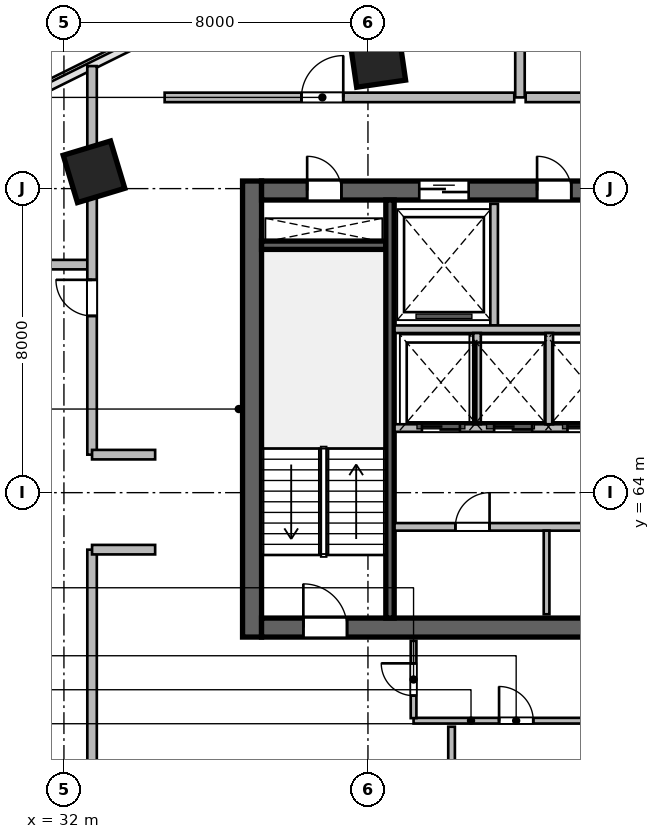
"""IFC4 building model, lengths in metres.
Left out: names, types, materials, properties, quantities, classifications, styles, units other than length and angle.
Written with IfcOpenShell. Run it as: python <this file> out.ifc"""

import sys

from ifc_helpers import new_model, si_unit, direction, frame, frame_2d, origin, origin_2d, place, context, subcontext, project, spatial, rectangle, extrude, source, transform, mapped, element, fill, save


model = new_model("IFC4")
c1 = context("Model", 3, precision=1e-05, world=origin(), true_north=direction((0.0, 1.0)))
c2 = subcontext(c1, "Body", "Model", "MODEL_VIEW")
j1 = project(units=[si_unit("LENGTHUNIT", "METRE"), si_unit("PLANEANGLEUNIT", "RADIAN")], contexts=[c1])
p1 = place(None, origin())
s1 = spatial("IfcSite", under=j1, at=p1, CompositionType="ELEMENT")
p2 = place(p1, origin())
s2 = spatial("IfcBuilding", under=s1, at=p2, CompositionType="ELEMENT")
p3 = place(p2, frame((0.0, 0.0, 123.3)))
s3 = spatial("IfcBuildingStorey", under=s2, at=p3, CompositionType="ELEMENT", Elevation=123.3)
m1 = source(origin(), c2, "Body", "SweptSolid", [
    extrude(rectangle(XDim=12.0, YDim=0.5, at=frame_2d((6.0, 0.0))), origin(), (0.0, 0.0, 1.0), 3.9),
])
p4 = place(p3, frame((36.95, 60.2, 0.0), z_axis=(0.0, 0.0, 1.0), x_axis=(0.0, 1.0, 0.0)))
e1 = element("IfcWall", 1, at=p4, inside=s3, PredefinedType="SHEAR", context=c2, shape_type="MappedRepresentation", body=[
    mapped(m1, transform((0.0, 0.0, 0.0), scale=1.0)),
])
m2 = source(origin(), c2, "Body", "SweptSolid", [
    extrude(rectangle(XDim=21.6, YDim=0.5, at=frame_2d((10.8, 0.0))), origin(), (0.0, 0.0, 1.0), 3.9),
])
p5 = place(p3, frame((37.2, 60.45, 0.0), z_axis=(0.0, 0.0, 1.0), x_axis=(1.0, 0.0, 0.0)))
e2 = element("IfcWall", 2, at=p5, inside=s3, PredefinedType="SHEAR", context=c2, shape_type="MappedRepresentation", body=[
    mapped(m2, transform((0.0, 0.0, 0.0), scale=1.0)),
])
p6 = place(p5, frame((1.1, 0.0, 0.0)))
e3 = element("IfcOpeningElement", 3, at=p6, cuts=e2, PredefinedType="OPENING", context=c2, shape_type="SweptSolid", body=[
    extrude(rectangle(XDim=1.15, YDim=2.15, at=frame_2d((0.575, 1.075))), frame((0.0, 0.26, 0.0), z_axis=(0.0, -1.0, 0.0), x_axis=(1.0, 0.0, 0.0)), (0.0, 0.0, 1.0), 0.52),
])
p7 = place(p5, frame((19.5, 0.0, 0.0)))
e4 = element("IfcOpeningElement", 4, at=p7, cuts=e2, PredefinedType="OPENING", context=c2, shape_type="SweptSolid", body=[
    extrude(rectangle(XDim=0.9, YDim=2.1, at=frame_2d((0.45, 1.05))), frame((0.0, 0.26, 0.0), z_axis=(0.0, -1.0, 0.0), x_axis=(1.0, 0.0, 0.0)), (0.0, 0.0, 1.0), 0.52),
])
p8 = place(p5, frame((12.02, 0.0, 0.0)))
e5 = element("IfcOpeningElement", 5, at=p8, cuts=e2, PredefinedType="OPENING", context=c2, shape_type="SweptSolid", body=[
    extrude(rectangle(XDim=1.6, YDim=2.15, at=frame_2d((0.8, 1.075))), frame((0.0, 0.26, 0.0), z_axis=(0.0, -1.0, 0.0), x_axis=(1.0, 0.0, 0.0)), (0.0, 0.0, 1.0), 0.52),
])
p9 = place(p3, frame((37.2, 71.95, 0.0), z_axis=(0.0, 0.0, 1.0), x_axis=(1.0, 0.0, 0.0)))
e6 = element("IfcWall", 6, at=p9, inside=s3, PredefinedType="SHEAR", context=c2, shape_type="MappedRepresentation", body=[
    mapped(m2, transform((0.0, 0.0, 0.0), scale=1.0)),
])
p10 = place(p9, frame((1.2, 0.0, 0.0)))
e7 = element("IfcOpeningElement", 7, at=p10, cuts=e6, PredefinedType="OPENING", context=c2, shape_type="SweptSolid", body=[
    extrude(rectangle(XDim=0.9, YDim=2.1, at=frame_2d((0.45, 1.05))), frame((0.0, 0.26, 0.0), z_axis=(0.0, -1.0, 0.0), x_axis=(1.0, 0.0, 0.0)), (0.0, 0.0, 1.0), 0.52),
])
p11 = place(p9, frame((14.7, 0.0, 0.0)))
e8 = element("IfcOpeningElement", 8, at=p11, cuts=e6, PredefinedType="OPENING", context=c2, shape_type="SweptSolid", body=[
    extrude(rectangle(XDim=1.2, YDim=2.15, at=frame_2d((0.6, 1.075))), frame((0.0, 0.26, 0.0), z_axis=(0.0, -1.0, 0.0), x_axis=(1.0, 0.0, 0.0)), (0.0, 0.0, 1.0), 0.52),
])
p12 = place(p9, frame((4.15, 0.0, 0.0)))
e9 = element("IfcOpeningElement", 9, at=p12, cuts=e6, PredefinedType="OPENING", context=c2, shape_type="SweptSolid", body=[
    extrude(rectangle(XDim=1.3, YDim=2.15, at=frame_2d((0.65, 1.075))), frame((0.0, 0.26, 0.0), z_axis=(0.0, -1.0, 0.0), x_axis=(1.0, 0.0, 0.0)), (0.0, 0.0, 1.0), 0.52),
])
p13 = place(p9, frame((7.25, 0.0, 0.0)))
e10 = element("IfcOpeningElement", 10, at=p13, cuts=e6, PredefinedType="OPENING", context=c2, shape_type="SweptSolid", body=[
    extrude(rectangle(XDim=0.9, YDim=2.1, at=frame_2d((0.45, 1.05))), frame((0.0, 0.26, 0.0), z_axis=(0.0, -1.0, 0.0), x_axis=(1.0, 0.0, 0.0)), (0.0, 0.0, 1.0), 0.52),
])
m3 = source(origin(), c2, "Body", "SweptSolid", [
    extrude(rectangle(XDim=3.27, YDim=0.22, at=frame_2d((1.635, 0.0))), origin(), (0.0, 0.0, 1.0), 3.9),
])
p14 = place(p3, frame((37.2, 70.51, 0.0), z_axis=(0.0, 0.0, 1.0), x_axis=(1.0, 0.0, 0.0)))
e11 = element("IfcWall", 11, at=p14, inside=s3, PredefinedType="SHEAR", context=c2, shape_type="MappedRepresentation", body=[
    mapped(m3, transform((0.0, 0.0, 0.0), scale=1.0)),
])
m4 = source(origin(), c2, "Body", "SweptSolid", [
    extrude(rectangle(XDim=11.0, YDim=0.22, at=frame_2d((5.5, 0.0))), origin(), (0.0, 0.0, 1.0), 3.9),
])
p15 = place(p3, frame((40.58, 60.7, 0.0), z_axis=(0.0, 0.0, 1.0), x_axis=(0.0, 1.0, 0.0)))
e12 = element("IfcWall", 12, at=p15, inside=s3, PredefinedType="SHEAR", context=c2, shape_type="MappedRepresentation", body=[
    mapped(m4, transform((0.0, 0.0, 0.0), scale=1.0)),
])
m5 = source(origin(), c2, "Body", "SweptSolid", [
    extrude(rectangle(XDim=1.3, YDim=1.3, at=origin_2d()), origin(), (0.0, 0.0, 1.0), 3.9),
])
for number, where, z_axis, x_axis in (
    (13, (32.791, 72.442, 0.0), (0.0, 0.0, 1.0), (-0.289, 0.957, 0.0)),
    (14, (40.253, 75.404, 0.0), (0.0, 0.0, 1.0), (-0.143, 0.99, 0.0)),
):
    element("IfcColumn", number, at=place(p3, frame(where, z_axis=z_axis, x_axis=x_axis)), inside=s3, PredefinedType="COLUMN", context=c2, shape_type="MappedRepresentation", body=[
        mapped(m5, transform((0.0, 0.0, 0.0), scale=1.0)),
    ])
m6 = source(origin(), c2, "Body", "SweptSolid", [
    extrude(rectangle(XDim=3.2, YDim=0.2, at=frame_2d((1.6, 0.0))), origin(), (0.0, 0.0, 1.0), 3.65),
])
p16 = place(p3, frame((43.32, 68.4, 0.0), z_axis=(0.0, 0.0, 1.0), x_axis=(0.0, 1.0, 0.0)))
e15 = element("IfcWall", 15, at=p16, inside=s3, PredefinedType="SOLIDWALL", context=c2, shape_type="MappedRepresentation", body=[
    mapped(m6, transform((0.0, 0.0, 0.0), scale=1.0)),
])
m7 = source(origin(), c2, "Body", "SweptSolid", [
    extrude(rectangle(XDim=8.8, YDim=0.2, at=frame_2d((4.4, 0.0))), origin(), (0.0, 0.0, 1.0), 3.65),
])
p17 = place(p3, frame((40.7, 68.3, 0.0), z_axis=(0.0, 0.0, 1.0), x_axis=(1.0, 0.0, 0.0)))
e16 = element("IfcWall", 16, at=p17, inside=s3, PredefinedType="SOLIDWALL", context=c2, shape_type="MappedRepresentation", body=[
    mapped(m7, transform((0.0, 0.0, 0.0), scale=1.0)),
])
m8 = source(origin(), c2, "Body", "SweptSolid", [
    extrude(rectangle(XDim=8.02, YDim=0.2, at=frame_2d((4.01, 0.0))), origin(), (0.0, 0.0, 1.0), 3.65),
])
p18 = place(p3, frame((40.7, 63.1, 0.0), z_axis=(0.0, 0.0, 1.0), x_axis=(1.0, 0.0, 0.0)))
e17 = element("IfcWall", 17, at=p18, inside=s3, PredefinedType="SOLIDWALL", context=c2, shape_type="MappedRepresentation", body=[
    mapped(m8, transform((0.0, 0.0, 0.0), scale=1.0)),
])
p19 = place(p18, frame((1.6, 0.0, 0.0)))
e18 = element("IfcOpeningElement", 18, at=p19, cuts=e17, PredefinedType="OPENING", context=c2, shape_type="SweptSolid", body=[
    extrude(rectangle(XDim=0.9, YDim=2.1, at=frame_2d((0.45, 1.05))), frame((0.0, 0.11, 0.0), z_axis=(0.0, -1.0, 0.0), x_axis=(1.0, 0.0, 0.0)), (0.0, 0.0, 1.0), 0.22),
])
p20 = place(p18, frame((5.54, 0.0, 0.0)))
e19 = element("IfcOpeningElement", 19, at=p20, cuts=e17, PredefinedType="OPENING", context=c2, shape_type="SweptSolid", body=[
    extrude(rectangle(XDim=0.9, YDim=2.1, at=frame_2d((0.45, 1.05))), frame((0.0, 0.11, 0.0), z_axis=(0.0, -1.0, 0.0), x_axis=(1.0, 0.0, 0.0)), (0.0, 0.0, 1.0), 0.22),
])
m9 = source(origin(), c2, "Body", "SweptSolid", [
    extrude(rectangle(XDim=2.2, YDim=0.15, at=frame_2d((1.1, 0.0))), origin(), (0.0, 0.0, 1.0), 3.65),
])
p21 = place(p3, frame((44.7, 60.8, 0.0), z_axis=(0.0, 0.0, 1.0), x_axis=(0.0, 1.0, 0.0)))
e20 = element("IfcWall", 20, at=p21, inside=s3, PredefinedType="PARTITIONING", context=c2, shape_type="MappedRepresentation", body=[
    mapped(m9, transform((0.0, 0.0, 0.0), scale=1.0)),
])
p22 = place(p3, frame((40.7, 65.7, 0.0), z_axis=(0.0, 0.0, 1.0), x_axis=(1.0, 0.0, 0.0)))
e21 = element("IfcWall", 21, at=p22, inside=s3, PredefinedType="SOLIDWALL", context=c2, shape_type="MappedRepresentation", body=[
    mapped(m7, transform((0.0, 0.0, 0.0), scale=1.0)),
])
p23 = place(p22, frame((0.72, 0.0, 0.0)))
e22 = element("IfcOpeningElement", 22, at=p23, cuts=e21, PredefinedType="OPENING", context=c2, shape_type="SweptSolid", body=[
    extrude(rectangle(XDim=1.0, YDim=2.15, at=frame_2d((0.5, 1.075))), frame((0.0, 0.11, 0.0), z_axis=(0.0, -1.0, 0.0), x_axis=(1.0, 0.0, 0.0)), (0.0, 0.0, 1.0), 0.22),
])
p24 = place(p22, frame((2.62, 0.0, 0.0)))
e23 = element("IfcOpeningElement", 23, at=p24, cuts=e21, PredefinedType="OPENING", context=c2, shape_type="SweptSolid", body=[
    extrude(rectangle(XDim=1.0, YDim=2.15, at=frame_2d((0.5, 1.075))), frame((0.0, 0.11, 0.0), z_axis=(0.0, -1.0, 0.0), x_axis=(1.0, 0.0, 0.0)), (0.0, 0.0, 1.0), 0.22),
])
p25 = place(p22, frame((4.55, 0.0, 0.0)))
e24 = element("IfcOpeningElement", 24, at=p25, cuts=e21, PredefinedType="OPENING", context=c2, shape_type="SweptSolid", body=[
    extrude(rectangle(XDim=1.0, YDim=2.15, at=frame_2d((0.5, 1.075))), frame((0.0, 0.11, 0.0), z_axis=(0.0, -1.0, 0.0), x_axis=(1.0, 0.0, 0.0)), (0.0, 0.0, 1.0), 0.22),
])
p26 = place(p22, frame((6.55, 0.0, 0.0)))
e25 = element("IfcOpeningElement", 25, at=p26, cuts=e21, PredefinedType="OPENING", context=c2, shape_type="SweptSolid", body=[
    extrude(rectangle(XDim=1.0, YDim=2.15, at=frame_2d((0.5, 1.075))), frame((0.0, 0.11, 0.0), z_axis=(0.0, -1.0, 0.0), x_axis=(1.0, 0.0, 0.0)), (0.0, 0.0, 1.0), 0.22),
])
m10 = source(origin(), c2, "Body", "SweptSolid", [
    extrude(rectangle(XDim=2.4, YDim=0.2, at=frame_2d((1.2, 0.0))), origin(), (0.0, 0.0, 1.0), 3.65),
])
for number, where, z_axis, x_axis in (
    (26, (42.87, 65.8, 0.0), (0.0, 0.0, 1.0), (0.0, 1.0, 0.0)),
    (27, (44.77, 65.8, 0.0), (0.0, 0.0, 1.0), (0.0, 1.0, 0.0)),
):
    element("IfcWall", number, at=place(p3, frame(where, z_axis=z_axis, x_axis=x_axis)), inside=s3, PredefinedType="SOLIDWALL", context=c2, shape_type="MappedRepresentation", body=[
        mapped(m10, transform((0.0, 0.0, 0.0), scale=1.0)),
    ])
m11 = source(origin(), c2, "Body", "SweptSolid", [
    extrude(rectangle(XDim=5.4, YDim=0.15, at=frame_2d((2.7, 0.0))), origin(), (0.0, 0.0, 1.0), 3.65),
])
p27 = place(p3, frame((41.2, 58.0, 0.0), z_axis=(0.0, 0.0, 1.0), x_axis=(1.0, 0.0, 0.0)))
e28 = element("IfcWall", 28, at=p27, inside=s3, PredefinedType="PARTITIONING", context=c2, shape_type="MappedRepresentation", body=[
    mapped(m11, transform((0.0, 0.0, 0.0), scale=1.0)),
])
p28 = place(p27, frame((2.25, 0.0, 0.0)))
e29 = element("IfcOpeningElement", 29, at=p28, cuts=e28, PredefinedType="OPENING", context=c2, shape_type="SweptSolid", body=[
    extrude(rectangle(XDim=0.9, YDim=2.08, at=frame_2d((0.45, 1.04))), frame((0.0, 0.085, 0.0), z_axis=(0.0, -1.0, 0.0), x_axis=(1.0, 0.0, 0.0)), (0.0, 0.0, 1.0), 0.17),
])
m12 = source(origin(), c2, "Body", "SweptSolid", [
    extrude(rectangle(XDim=2.033, YDim=0.15, at=frame_2d((1.016, 0.0))), origin(), (0.0, 0.0, 1.0), 3.65),
])
p29 = place(p3, frame((41.2, 58.067, 0.0), z_axis=(0.0, 0.0, 1.0), x_axis=(0.0, 1.0, 0.0)))
e30 = element("IfcWall", 30, at=p29, inside=s3, PredefinedType="PARTITIONING", context=c2, shape_type="MappedRepresentation", body=[
    mapped(m12, transform((0.0, 0.0, 0.0), scale=1.0)),
])
p30 = place(p29, frame((0.591, 0.0, 0.0)))
e31 = element("IfcOpeningElement", 31, at=p30, cuts=e30, PredefinedType="OPENING", context=c2, shape_type="SweptSolid", body=[
    extrude(rectangle(XDim=0.85, YDim=2.1, at=frame_2d((0.425, 1.05))), frame((0.0, 0.085, 0.0), z_axis=(0.0, -1.0, 0.0), x_axis=(1.0, 0.0, 0.0)), (0.0, 0.0, 1.0), 0.17),
])
m13 = source(origin(), c2, "Body", "SweptSolid", [
    extrude(rectangle(XDim=3.763, YDim=0.175, at=frame_2d((1.881, 0.0))), origin(), (0.0, 0.0, 1.0), 3.65),
])
p31 = place(p3, frame((42.2, 54.079, 0.0), z_axis=(0.0, 0.0, 1.0), x_axis=(0.0, 1.0, 0.0)))
e32 = element("IfcWall", 32, at=p31, inside=s3, PredefinedType="PARTITIONING", context=c2, shape_type="MappedRepresentation", body=[
    mapped(m13, transform((0.0, 0.0, 0.0), scale=1.0)),
])
m14 = source(origin(), c2, "Body", "SweptSolid", [
    extrude(rectangle(XDim=2.5, YDim=0.25, at=frame_2d((1.25, 0.0))), origin(), (0.0, 0.0, 1.0), 3.65),
])
p32 = place(p3, frame((30.2, 70.0, 0.0), z_axis=(0.0, 0.0, 1.0), x_axis=(1.0, 0.0, 0.0)))
e33 = element("IfcWall", 33, at=p32, inside=s3, PredefinedType="PARTITIONING", context=c2, shape_type="MappedRepresentation", body=[
    mapped(m14, transform((0.0, 0.0, 0.0), scale=1.0)),
])
m15 = source(origin(), c2, "Body", "SweptSolid", [
    extrude(rectangle(XDim=9.2, YDim=0.25, at=frame_2d((4.6, 0.0))), origin(), (0.0, 0.0, 1.0), 3.022),
])
p33 = place(p3, frame((34.65, 74.4, 0.0), z_axis=(0.0, 0.0, 1.0), x_axis=(1.0, 0.0, 0.0)))
e34 = element("IfcWall", 34, at=p33, inside=s3, PredefinedType="PARTITIONING", context=c2, shape_type="MappedRepresentation", body=[
    mapped(m15, transform((0.0, 0.0, 0.0), scale=1.0)),
])
p34 = place(p33, frame((3.6, 0.0, 0.0)))
e35 = element("IfcOpeningElement", 35, at=p34, cuts=e34, PredefinedType="OPENING", context=c2, shape_type="SweptSolid", body=[
    extrude(rectangle(XDim=1.1, YDim=2.15, at=frame_2d((0.55, 1.075))), frame((0.0, 0.135, 0.0), z_axis=(0.0, -1.0, 0.0), x_axis=(1.0, 0.0, 0.0)), (0.0, 0.0, 1.0), 0.27),
])
m16 = source(origin(), c2, "Body", "SweptSolid", [
    extrude(rectangle(XDim=4.423, YDim=0.25, at=frame_2d((2.211, 0.0))), origin(), (0.0, 0.0, 1.0), 3.65),
])
p35 = place(p3, frame((44.0, 74.4, 0.0), z_axis=(0.0, 0.0, 1.0), x_axis=(0.0, 1.0, 0.0)))
e36 = element("IfcWall", 36, at=p35, inside=s3, PredefinedType="PARTITIONING", context=c2, shape_type="MappedRepresentation", body=[
    mapped(m16, transform((0.0, 0.0, 0.0), scale=1.0)),
])
m17 = source(origin(), c2, "Body", "SweptSolid", [
    extrude(rectangle(XDim=7.7, YDim=0.25, at=frame_2d((3.85, 0.0))), origin(), (0.0, 0.0, 1.0), 3.65),
])
p36 = place(p3, frame((44.15, 74.4, 0.0), z_axis=(0.0, 0.0, 1.0), x_axis=(1.0, 0.0, 0.0)))
e37 = element("IfcWall", 37, at=p36, inside=s3, PredefinedType="PARTITIONING", context=c2, shape_type="MappedRepresentation", body=[
    mapped(m17, transform((0.0, 0.0, 0.0), scale=1.0)),
])
p37 = place(p36, frame((3.3, 0.0, 0.0)))
e38 = element("IfcOpeningElement", 38, at=p37, cuts=e37, PredefinedType="OPENING", context=c2, shape_type="SweptSolid", body=[
    extrude(rectangle(XDim=1.1, YDim=2.15, at=frame_2d((0.55, 1.075))), frame((0.0, 0.135, 0.0), z_axis=(0.0, -1.0, 0.0), x_axis=(1.0, 0.0, 0.0)), (0.0, 0.0, 1.0), 0.27),
])
m18 = source(origin(), c2, "Body", "SweptSolid", [
    extrude(rectangle(XDim=16.706, YDim=0.25, at=frame_2d((8.353, 0.0))), origin(), (0.0, 0.0, 1.0), 2.942),
])
p38 = place(p3, frame((32.74, 45.794, 0.0), z_axis=(0.0, 0.0, 1.0), x_axis=(0.0, 1.0, 0.0)))
e39 = element("IfcWall", 39, at=p38, inside=s3, PredefinedType="PARTITIONING", context=c2, shape_type="MappedRepresentation", body=[
    mapped(m18, transform((0.0, 0.0, 0.0), scale=1.0)),
])
p39 = place(p38, frame((7.878, 0.0, 0.0)))
e40 = element("IfcOpeningElement", 40, at=p39, cuts=e39, PredefinedType="OPENING", context=c2, shape_type="SweptSolid", body=[
    extrude(rectangle(XDim=0.95, YDim=2.1, at=frame_2d((0.475, 1.05))), frame((0.0, 0.135, 0.0), z_axis=(0.0, -1.0, 0.0), x_axis=(1.0, 0.0, 0.0)), (0.0, 0.0, 1.0), 0.27),
])
m19 = source(origin(), c2, "Body", "SweptSolid", [
    extrude(rectangle(XDim=1.66, YDim=0.25, at=frame_2d((0.83, 0.0))), origin(), (0.0, 0.0, 1.0), 3.65),
])
p40 = place(p3, frame((32.74, 62.5, 0.0), z_axis=(0.0, 0.0, 1.0), x_axis=(1.0, 0.0, 0.0)))
e41 = element("IfcWall", 41, at=p40, inside=s3, PredefinedType="PARTITIONING", context=c2, shape_type="MappedRepresentation", body=[
    mapped(m19, transform((0.0, 0.0, 0.0), scale=1.0)),
])
m20 = source(origin(), c2, "Body", "SweptSolid", [
    extrude(rectangle(XDim=10.224, YDim=0.25, at=frame_2d((5.112, 0.0))), origin(), (0.0, 0.0, 1.0), 3.65),
])
p41 = place(p3, frame((32.74, 65.0, 0.0), z_axis=(0.0, 0.0, 1.0), x_axis=(0.0, 1.0, 0.0)))
e42 = element("IfcWall", 42, at=p41, inside=s3, PredefinedType="PARTITIONING", context=c2, shape_type="MappedRepresentation", body=[
    mapped(m20, transform((0.0, 0.0, 0.0), scale=1.0)),
])
p42 = place(p41, frame((3.65, 0.0, 0.0)))
e43 = element("IfcOpeningElement", 43, at=p42, cuts=e42, PredefinedType="OPENING", context=c2, shape_type="SweptSolid", body=[
    extrude(rectangle(XDim=0.95, YDim=2.1, at=frame_2d((0.475, 1.05))), frame((0.0, 0.135, 0.0), z_axis=(0.0, -1.0, 0.0), x_axis=(1.0, 0.0, 0.0)), (0.0, 0.0, 1.0), 0.27),
])
p43 = place(p3, frame((32.74, 65.0, 0.0), z_axis=(0.0, 0.0, 1.0), x_axis=(1.0, 0.0, 0.0)))
e44 = element("IfcWall", 44, at=p43, inside=s3, PredefinedType="PARTITIONING", context=c2, shape_type="MappedRepresentation", body=[
    mapped(m19, transform((0.0, 0.0, 0.0), scale=1.0)),
])
m21 = source(origin(), c2, "Body", "SweptSolid", [
    extrude(rectangle(XDim=1.15, YDim=2.15, at=frame_2d((0.575, 1.075))), frame((0.0, 0.025, 0.0), z_axis=(0.0, -1.0, 0.0), x_axis=(1.0, 0.0, 0.0)), (0.0, 0.0, 1.0), 0.05),
])
p44 = place(p6, origin())
e45 = element("IfcDoor", 45, at=p44, inside=s3, OperationType="SINGLE_SWING_LEFT", PredefinedType="DOOR", context=c2, shape_type="MappedRepresentation", body=[
    mapped(m21, transform((0.0, 0.0, 0.0), scale=1.0)),
])
fill(e3, e45)
m22 = source(origin(), c2, "Body", "SweptSolid", [
    extrude(rectangle(XDim=0.9, YDim=2.1, at=frame_2d((0.45, 1.05))), frame((0.0, 0.025, 0.0), z_axis=(0.0, -1.0, 0.0), x_axis=(1.0, 0.0, 0.0)), (0.0, 0.0, 1.0), 0.05),
])
p45 = place(p10, origin())
e46 = element("IfcDoor", 46, at=p45, inside=s3, OperationType="SINGLE_SWING_LEFT", PredefinedType="DOOR", context=c2, shape_type="MappedRepresentation", body=[
    mapped(m22, transform((0.0, 0.0, 0.0), scale=1.0)),
])
fill(e7, e46)
m23 = source(origin(), c2, "Body", "SweptSolid", [
    extrude(rectangle(XDim=1.3, YDim=2.15, at=frame_2d((0.65, 1.075))), frame((0.0, 0.025, 0.0), z_axis=(0.0, -1.0, 0.0), x_axis=(1.0, 0.0, 0.0)), (0.0, 0.0, 1.0), 0.05),
])
p46 = place(p12, origin())
e47 = element("IfcDoor", 47, at=p46, inside=s3, OperationType="DOUBLE_DOOR_SLIDING", PredefinedType="DOOR", context=c2, shape_type="MappedRepresentation", body=[
    mapped(m23, transform((0.0, 0.0, 0.0), scale=1.0)),
])
fill(e9, e47)
p47 = place(p13, origin())
e48 = element("IfcDoor", 48, at=p47, inside=s3, OperationType="SINGLE_SWING_LEFT", PredefinedType="DOOR", context=c2, shape_type="MappedRepresentation", body=[
    mapped(m22, transform((0.0, 0.0, 0.0), scale=1.0)),
])
fill(e10, e48)
p48 = place(p19, origin())
e49 = element("IfcDoor", 49, at=p48, inside=s3, OperationType="SINGLE_SWING_RIGHT", PredefinedType="DOOR", context=c2, shape_type="MappedRepresentation", body=[
    mapped(m22, transform((0.0, 0.0, 0.0), scale=1.0)),
])
fill(e18, e49)
m24 = source(origin(), c2, "Body", "SweptSolid", [
    extrude(rectangle(XDim=1.0, YDim=2.15, at=frame_2d((0.5, 1.075))), frame((0.0, 0.025, 0.0), z_axis=(0.0, -1.0, 0.0), x_axis=(1.0, 0.0, 0.0)), (0.0, 0.0, 1.0), 0.05),
])
p49 = place(p23, origin())
e50 = element("IfcDoor", 50, at=p49, inside=s3, OperationType="DOUBLE_DOOR_SLIDING", PredefinedType="DOOR", context=c2, shape_type="MappedRepresentation", body=[
    mapped(m24, transform((0.0, 0.0, 0.0), scale=1.0)),
])
fill(e22, e50)
p50 = place(p24, origin())
e51 = element("IfcDoor", 51, at=p50, inside=s3, OperationType="DOUBLE_DOOR_SLIDING", PredefinedType="DOOR", context=c2, shape_type="MappedRepresentation", body=[
    mapped(m24, transform((0.0, 0.0, 0.0), scale=1.0)),
])
fill(e23, e51)
p51 = place(p25, origin())
e52 = element("IfcDoor", 52, at=p51, inside=s3, OperationType="DOUBLE_DOOR_SLIDING", PredefinedType="DOOR", context=c2, shape_type="MappedRepresentation", body=[
    mapped(m24, transform((0.0, 0.0, 0.0), scale=1.0)),
])
fill(e24, e52)
m25 = source(origin(), c2, "Body", "SweptSolid", [
    extrude(rectangle(XDim=0.85, YDim=2.1, at=frame_2d((0.425, 1.05))), frame((0.0, 0.025, 0.0), z_axis=(0.0, -1.0, 0.0), x_axis=(1.0, 0.0, 0.0)), (0.0, 0.0, 1.0), 0.05),
])
p52 = place(p30, origin())
e53 = element("IfcDoor", 53, at=p52, inside=s3, OperationType="SINGLE_SWING_RIGHT", PredefinedType="DOOR", context=c2, shape_type="MappedRepresentation", body=[
    mapped(m25, transform((0.0, 0.0, 0.0), scale=1.0)),
])
fill(e31, e53)
m26 = source(origin(), c2, "Body", "SweptSolid", [
    extrude(rectangle(XDim=0.9, YDim=2.08, at=frame_2d((0.45, 1.04))), frame((0.0, 0.025, 0.0), z_axis=(0.0, -1.0, 0.0), x_axis=(1.0, 0.0, 0.0)), (0.0, 0.0, 1.0), 0.05),
])
p53 = place(p28, origin())
e54 = element("IfcDoor", 54, at=p53, inside=s3, OperationType="SINGLE_SWING_LEFT", PredefinedType="DOOR", context=c2, shape_type="MappedRepresentation", body=[
    mapped(m26, transform((0.0, 0.0, 0.0), scale=1.0)),
])
fill(e29, e54)
m27 = source(origin(), c2, "Body", "SweptSolid", [
    extrude(rectangle(XDim=1.1, YDim=2.15, at=frame_2d((0.55, 1.075))), frame((0.0, 0.025, 0.0), z_axis=(0.0, -1.0, 0.0), x_axis=(1.0, 0.0, 0.0)), (0.0, 0.0, 1.0), 0.05),
])
p54 = place(p34, origin())
e55 = element("IfcDoor", 55, at=p54, inside=s3, OperationType="SINGLE_SWING_RIGHT", PredefinedType="DOOR", context=c2, shape_type="MappedRepresentation", body=[
    mapped(m27, transform((0.0, 0.0, 0.0), scale=1.0)),
])
fill(e35, e55)
m28 = source(origin(), c2, "Body", "SweptSolid", [
    extrude(rectangle(XDim=0.95, YDim=2.1, at=frame_2d((0.475, 1.05))), frame((0.0, 0.025, 0.0), z_axis=(0.0, -1.0, 0.0), x_axis=(1.0, 0.0, 0.0)), (0.0, 0.0, 1.0), 0.05),
])
p55 = place(p42, origin())
e56 = element("IfcDoor", 56, at=p55, inside=s3, OperationType="SINGLE_SWING_RIGHT", PredefinedType="DOOR", context=c2, shape_type="MappedRepresentation", body=[
    mapped(m28, transform((0.0, 0.0, 0.0), scale=1.0)),
])
fill(e43, e56)
save(model, sys.argv[1])
